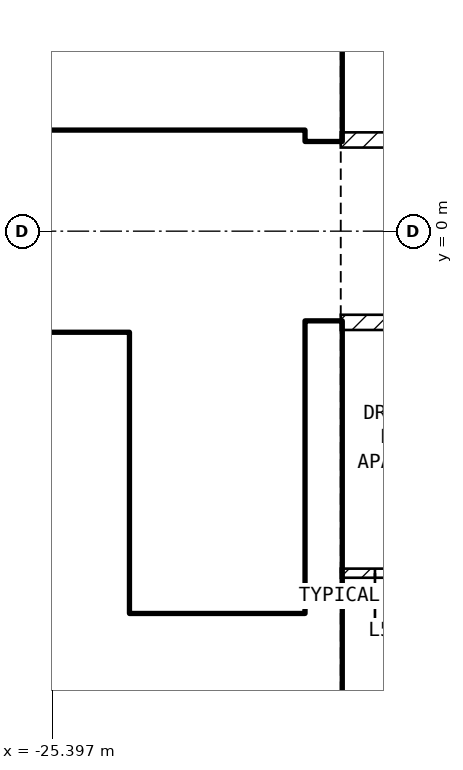
"""IFC4 building model, lengths in metres.
Left out: names, types, materials, properties, quantities, classifications, styles, units other than length and angle.
Written with IfcOpenShell. Run it as: python <this file> out.ifc"""

import sys

from ifc_helpers import new_model, si_unit, direction, frame, frame_2d, origin, place, context, subcontext, project, spatial, rectangle, extrude, element, fill, save


model = new_model("IFC4")
c1 = context("Model", 3, precision=1e-05, world=origin(), true_north=direction((0.0, 1.0)))
c2 = subcontext(c1, "Body", "Model", "MODEL_VIEW")
j1 = project(units=[si_unit("LENGTHUNIT", "METRE"), si_unit("PLANEANGLEUNIT", "RADIAN")], contexts=[c1])
p1 = place(None, origin())
s1 = spatial("IfcSite", under=j1, at=p1, CompositionType="ELEMENT")
p2 = place(p1, origin())
s2 = spatial("IfcBuilding", under=s1, at=p2, CompositionType="ELEMENT")
p3 = place(p2, frame((0.0, 0.0, 215.6)))
s3 = spatial("IfcBuildingStorey", under=s2, at=p3, CompositionType="ELEMENT", Elevation=215.6)
for number, where, z_axis, x_axis in (
    (1, (-21.825, -8.1, 0.0), (0.0, 0.0, 1.0), (0.0, 1.0, 0.0)),
    (2, (-21.825, 1.2, 0.0), (0.0, 0.0, 1.0), (0.0, 1.0, 0.0)),
):
    element("IfcWall", number, at=place(p3, frame(where, z_axis=z_axis, x_axis=x_axis)), inside=s3, PredefinedType="SHEAR", context=c2, shape_type="SweptSolid", body=[
        extrude(rectangle(XDim=6.9, YDim=0.45, at=frame_2d((3.45, 0.0))), origin(), (0.0, 0.0, 1.0), 3.25),
    ])
p4 = place(p3, frame((-33.2, 1.45, 0.0), z_axis=(0.0, 0.0, 1.0), x_axis=(1.0, 0.0, 0.0)))
e3 = element("IfcWall", 3, at=p4, inside=s3, PredefinedType="SOLIDWALL", context=c2, shape_type="SweptSolid", body=[
    extrude(rectangle(XDim=11.15, YDim=0.2, at=frame_2d((5.575, 0.0))), origin(), (0.0, 0.0, 1.0), 3.25),
])
p5 = place(p4, frame((9.4, 0.0, 0.0)))
e4 = element("IfcOpeningElement", 4, at=p5, cuts=e3, PredefinedType="OPENING", context=c2, shape_type="SweptSolid", body=[
    extrude(rectangle(XDim=1.0, YDim=2.1, at=frame_2d((0.5, 1.05))), frame((0.0, 0.11, 0.0), z_axis=(0.0, -1.0, 0.0), x_axis=(1.0, 0.0, 0.0)), (0.0, 0.0, 1.0), 0.22),
])
p6 = place(p4, frame((6.9, 0.0, 0.0)))
e5 = element("IfcOpeningElement", 5, at=p6, cuts=e3, PredefinedType="OPENING", context=c2, shape_type="SweptSolid", body=[
    extrude(rectangle(XDim=1.0, YDim=2.1, at=frame_2d((0.5, 1.05))), frame((0.0, 0.11, 0.0), z_axis=(0.0, -1.0, 0.0), x_axis=(1.0, 0.0, 0.0)), (0.0, 0.0, 1.0), 0.22),
])
p7 = place(p4, frame((1.1, 0.0, 0.0)))
e6 = element("IfcOpeningElement", 6, at=p7, cuts=e3, PredefinedType="OPENING", context=c2, shape_type="SweptSolid", body=[
    extrude(rectangle(XDim=0.9, YDim=2.1, at=frame_2d((0.45, 1.05))), frame((0.0, 0.11, 0.0), z_axis=(0.0, -1.0, 0.0), x_axis=(1.0, 0.0, 0.0)), (0.0, 0.0, 1.0), 0.22),
])
p8 = place(p3, frame((-24.5, -5.05, 0.0), z_axis=(0.0, 0.0, 1.0), x_axis=(0.0, 1.0, 0.0)))
e7 = element("IfcWall", 7, at=p8, inside=s3, PredefinedType="SOLIDWALL", context=c2, shape_type="SweptSolid", body=[
    extrude(rectangle(XDim=3.7, YDim=0.2, at=frame_2d((1.85, 0.0))), origin(), (0.0, 0.0, 1.0), 3.25),
])
p9 = place(p8, frame((0.1, 0.0, 0.0)))
e8 = element("IfcOpeningElement", 8, at=p9, cuts=e7, PredefinedType="OPENING", context=c2, shape_type="SweptSolid", body=[
    extrude(rectangle(XDim=0.8, YDim=2.1, at=frame_2d((0.4, 1.05))), frame((0.0, 0.11, 0.0), z_axis=(0.0, -1.0, 0.0), x_axis=(1.0, 0.0, 0.0)), (0.0, 0.0, 1.0), 0.22),
])
p10 = place(p3, frame((-28.35, -5.15, 0.0), z_axis=(0.0, 0.0, 1.0), x_axis=(1.0, 0.0, 0.0)))
e9 = element("IfcWall", 9, at=p10, inside=s3, PredefinedType="SOLIDWALL", context=c2, shape_type="SweptSolid", body=[
    extrude(rectangle(XDim=6.3, YDim=0.2, at=frame_2d((3.15, 0.0))), origin(), (0.0, 0.0, 1.0), 3.25),
])
p11 = place(p10, frame((5.1, 0.0, 0.0)))
e10 = element("IfcOpeningElement", 10, at=p11, cuts=e9, PredefinedType="OPENING", context=c2, shape_type="SweptSolid", body=[
    extrude(rectangle(XDim=1.0, YDim=2.1, at=frame_2d((0.5, 1.05))), frame((0.0, 0.11, 0.0), z_axis=(0.0, -1.0, 0.0), x_axis=(1.0, 0.0, 0.0)), (0.0, 0.0, 1.0), 0.22),
])
p12 = place(p3, frame((-33.2, -1.45, 0.0), z_axis=(0.0, 0.0, 1.0), x_axis=(1.0, 0.0, 0.0)))
e11 = element("IfcWall", 11, at=p12, inside=s3, PredefinedType="SOLIDWALL", context=c2, shape_type="SweptSolid", body=[
    extrude(rectangle(XDim=8.6, YDim=0.2, at=frame_2d((4.3, 0.0))), origin(), (0.0, 0.0, 1.0), 3.25),
])
p13 = place(p12, frame((7.2, 0.0, 0.0)))
e12 = element("IfcOpeningElement", 12, at=p13, cuts=e11, PredefinedType="OPENING", context=c2, shape_type="SweptSolid", body=[
    extrude(rectangle(XDim=1.0, YDim=2.1, at=frame_2d((0.5, 1.05))), frame((0.0, 0.11, 0.0), z_axis=(0.0, -1.0, 0.0), x_axis=(1.0, 0.0, 0.0)), (0.0, 0.0, 1.0), 0.22),
])
p14 = place(p12, frame((5.2, 0.0, 0.0)))
e13 = element("IfcOpeningElement", 13, at=p14, cuts=e11, PredefinedType="OPENING", context=c2, shape_type="SweptSolid", body=[
    extrude(rectangle(XDim=1.0, YDim=2.1, at=frame_2d((0.5, 1.05))), frame((0.0, 0.11, 0.0), z_axis=(0.0, -1.0, 0.0), x_axis=(1.0, 0.0, 0.0)), (0.0, 0.0, 1.0), 0.22),
])
p15 = place(p12, frame((3.2, 0.0, 0.0)))
e14 = element("IfcOpeningElement", 14, at=p15, cuts=e11, PredefinedType="OPENING", context=c2, shape_type="SweptSolid", body=[
    extrude(rectangle(XDim=1.0, YDim=2.1, at=frame_2d((0.5, 1.05))), frame((0.0, 0.11, 0.0), z_axis=(0.0, -1.0, 0.0), x_axis=(1.0, 0.0, 0.0)), (0.0, 0.0, 1.0), 0.22),
])
p16 = place(p12, frame((0.85, 0.0, 0.0)))
e15 = element("IfcOpeningElement", 15, at=p16, cuts=e11, PredefinedType="OPENING", context=c2, shape_type="SweptSolid", body=[
    extrude(rectangle(XDim=0.9, YDim=2.1, at=frame_2d((0.45, 1.05))), frame((0.0, 0.11, 0.0), z_axis=(0.0, -1.0, 0.0), x_axis=(1.0, 0.0, 0.0)), (0.0, 0.0, 1.0), 0.22),
])
p17 = place(p3, frame((-33.2, -3.95, 0.0), z_axis=(0.0, 0.0, 1.0), x_axis=(1.0, 0.0, 0.0)))
e16 = element("IfcWall", 16, at=p17, inside=s3, PredefinedType="SOLIDWALL", context=c2, shape_type="SweptSolid", body=[
    extrude(rectangle(XDim=8.6, YDim=0.2, at=frame_2d((4.3, 0.0))), origin(), (0.0, 0.0, 1.0), 3.25),
])
p18 = place(p3, frame((-21.6, 1.2, 0.0), z_axis=(0.0, 0.0, 1.0), x_axis=(1.0, 0.0, 0.0)))
e17 = element("IfcWall", 17, at=p18, inside=s3, PredefinedType="PARTITIONING", context=c2, shape_type="SweptSolid", body=[
    extrude(rectangle(XDim=17.2, YDim=0.2, at=frame_2d((8.6, 0.0))), origin(), (0.0, 0.0, 1.0), 3.25),
])
p19 = place(p18, frame((6.1, 0.0, 0.0)))
e18 = element("IfcOpeningElement", 18, at=p19, cuts=e17, PredefinedType="OPENING", context=c2, shape_type="SweptSolid", body=[
    extrude(rectangle(XDim=1.0, YDim=2.1, at=frame_2d((0.5, 1.05))), frame((0.0, 0.11, 0.0), z_axis=(0.0, -1.0, 0.0), x_axis=(1.0, 0.0, 0.0)), (0.0, 0.0, 1.0), 0.22),
])
p20 = place(p3, frame((-4.4, -1.2, 0.0), z_axis=(0.0, 0.0, 1.0), x_axis=(-1.0, 0.0, 0.0)))
e19 = element("IfcWall", 19, at=p20, inside=s3, PredefinedType="PARTITIONING", context=c2, shape_type="SweptSolid", body=[
    extrude(rectangle(XDim=17.2, YDim=0.2, at=frame_2d((8.6, 0.0))), origin(), (0.0, 0.0, 1.0), 3.25),
])
p21 = place(p20, frame((5.9, 0.0, 0.0)))
e20 = element("IfcOpeningElement", 20, at=p21, cuts=e19, PredefinedType="OPENING", context=c2, shape_type="SweptSolid", body=[
    extrude(rectangle(XDim=1.0, YDim=2.1, at=frame_2d((0.5, 1.05))), frame((0.0, 0.11, 0.0), z_axis=(0.0, -1.0, 0.0), x_axis=(1.0, 0.0, 0.0)), (0.0, 0.0, 1.0), 0.22),
])
p22 = place(p3, frame((-19.8, -4.5, 0.0), z_axis=(0.0, 0.0, 1.0), x_axis=(-1.0, 0.0, 0.0)))
e21 = element("IfcWall", 21, at=p22, inside=s3, PredefinedType="PARTITIONING", context=c2, shape_type="SweptSolid", body=[
    extrude(rectangle(XDim=1.8, YDim=0.12, at=frame_2d((0.9, 0.0))), origin(), (0.0, 0.0, 1.0), 3.25),
])
p23 = place(p22, frame((0.45, 0.0, 0.0)))
e22 = element("IfcOpeningElement", 22, at=p23, cuts=e21, PredefinedType="OPENING", context=c2, shape_type="SweptSolid", body=[
    extrude(rectangle(XDim=0.9, YDim=2.1, at=frame_2d((0.45, 1.05))), frame((0.0, 0.07, 0.0), z_axis=(0.0, -1.0, 0.0), x_axis=(1.0, 0.0, 0.0)), (0.0, 0.0, 1.0), 0.14),
])
p24 = place(p13, origin())
e23 = element("IfcDoor", 23, at=p24, inside=s3, OperationType="DOUBLE_DOOR_SLIDING", PredefinedType="DOOR", context=c2, shape_type="SweptSolid", body=[
    extrude(rectangle(XDim=1.0, YDim=2.1, at=frame_2d((0.5, 1.05))), frame((0.0, 0.025, 0.0), z_axis=(0.0, -1.0, 0.0), x_axis=(1.0, 0.0, 0.0)), (0.0, 0.0, 1.0), 0.05),
])
fill(e12, e23)
p25 = place(p11, origin())
e24 = element("IfcDoor", 24, at=p25, inside=s3, OperationType="SINGLE_SWING_LEFT", PredefinedType="DOOR", context=c2, shape_type="SweptSolid", body=[
    extrude(rectangle(XDim=1.0, YDim=2.1, at=frame_2d((0.5, 1.05))), frame((0.0, 0.025, 0.0), z_axis=(0.0, -1.0, 0.0), x_axis=(1.0, 0.0, 0.0)), (0.0, 0.0, 1.0), 0.05),
])
fill(e10, e24)
p26 = place(p5, origin())
e25 = element("IfcDoor", 25, at=p26, inside=s3, OperationType="SINGLE_SWING_LEFT", PredefinedType="DOOR", context=c2, shape_type="SweptSolid", body=[
    extrude(rectangle(XDim=1.0, YDim=2.1, at=frame_2d((0.5, 1.05))), frame((0.0, 0.025, 0.0), z_axis=(0.0, -1.0, 0.0), x_axis=(1.0, 0.0, 0.0)), (0.0, 0.0, 1.0), 0.05),
])
fill(e4, e25)
p27 = place(p9, origin())
e26 = element("IfcDoor", 26, at=p27, inside=s3, OperationType="SINGLE_SWING_LEFT", PredefinedType="DOOR", context=c2, shape_type="SweptSolid", body=[
    extrude(rectangle(XDim=0.8, YDim=2.1, at=frame_2d((0.4, 1.05))), frame((0.0, 0.025, 0.0), z_axis=(0.0, -1.0, 0.0), x_axis=(1.0, 0.0, 0.0)), (0.0, 0.0, 1.0), 0.05),
])
fill(e8, e26)
p28 = place(p6, origin())
e27 = element("IfcDoor", 27, at=p28, inside=s3, OperationType="SINGLE_SWING_LEFT", PredefinedType="DOOR", context=c2, shape_type="SweptSolid", body=[
    extrude(rectangle(XDim=1.0, YDim=2.1, at=frame_2d((0.5, 1.05))), frame((0.0, 0.025, 0.0), z_axis=(0.0, -1.0, 0.0), x_axis=(1.0, 0.0, 0.0)), (0.0, 0.0, 1.0), 0.05),
])
fill(e5, e27)
p29 = place(p23, origin())
e28 = element("IfcDoor", 28, at=p29, inside=s3, OperationType="SINGLE_SWING_RIGHT", PredefinedType="DOOR", context=c2, shape_type="SweptSolid", body=[
    extrude(rectangle(XDim=0.9, YDim=2.1, at=frame_2d((0.45, 1.05))), frame((0.0, 0.025, 0.0), z_axis=(0.0, -1.0, 0.0), x_axis=(1.0, 0.0, 0.0)), (0.0, 0.0, 1.0), 0.05),
])
fill(e22, e28)
save(model, sys.argv[1])
